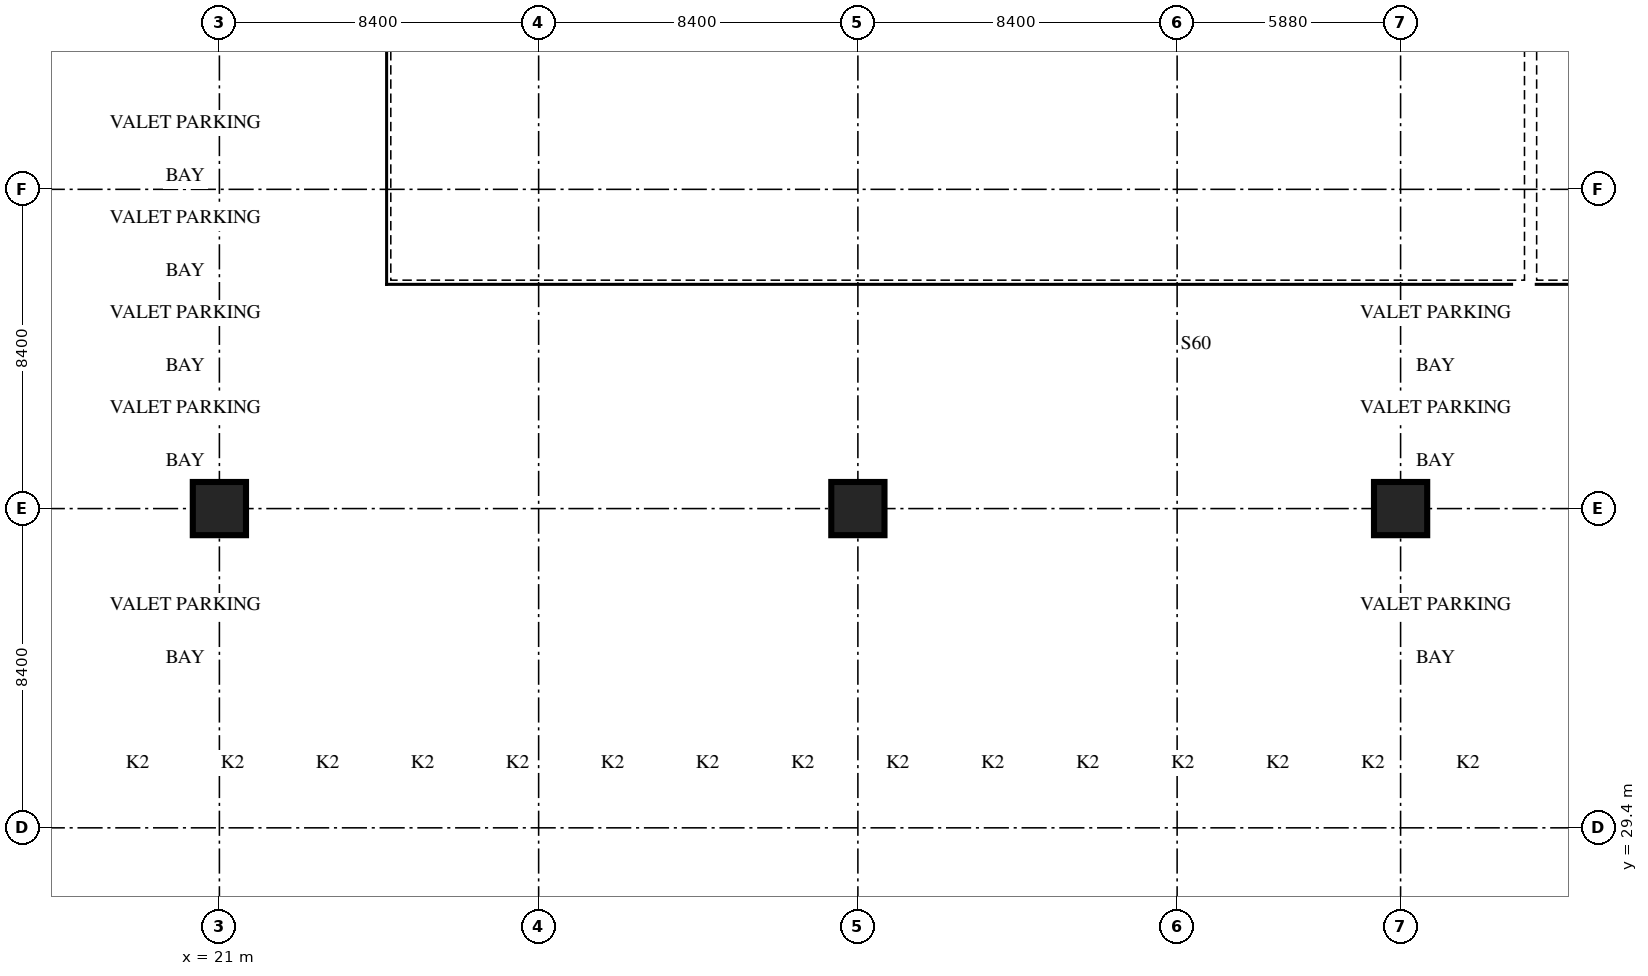
"""IFC4 building model, lengths in metres.
Left out: names, types, materials, properties, quantities, classifications, styles, units other than length and angle.
Written with IfcOpenShell. Run it as: python <this file> out.ifc"""

import sys

from ifc_helpers import new_model, si_unit, direction, frame, origin, origin_2d, place, context, subcontext, project, spatial, rectangle, extrude, source, transform, mapped, element, save


model = new_model("IFC4")
c1 = context("Model", 3, precision=1e-05, world=origin(), true_north=direction((0.0, 1.0)))
c2 = subcontext(c1, "Body", "Model", "MODEL_VIEW")
j1 = project(units=[si_unit("LENGTHUNIT", "METRE"), si_unit("PLANEANGLEUNIT", "RADIAN")], contexts=[c1])
p1 = place(None, origin())
s1 = spatial("IfcSite", under=j1, at=p1, CompositionType="ELEMENT")
p2 = place(p1, origin())
s2 = spatial("IfcBuilding", under=s1, at=p2, CompositionType="ELEMENT")
p3 = place(p2, frame((0.0, 0.0, -4.5)))
s3 = spatial("IfcBuildingStorey", under=s2, at=p3, CompositionType="ELEMENT", Elevation=-4.5)
m1 = source(origin(), c2, "Body", "SweptSolid", [
    extrude(rectangle(XDim=1.4, YDim=1.4, at=origin_2d()), origin(), (0.0, 0.0, 1.0), 4.5),
])
for number, where, z_axis, x_axis in (
    (1, (21.0, 37.8, 0.0), (0.0, 0.0, 1.0), (1.0, 0.0, 0.0)),
    (2, (37.8, 37.8, 0.0), (0.0, 0.0, 1.0), (1.0, 0.0, 0.0)),
    (3, (52.08, 37.8, 0.0), (0.0, 0.0, 1.0), (1.0, 0.0, 0.0)),
):
    element("IfcColumn", number, at=place(p3, frame(where, z_axis=z_axis, x_axis=x_axis)), inside=s3, PredefinedType="COLUMN", context=c2, shape_type="MappedRepresentation", body=[
        mapped(m1, transform((0.0, 0.0, 0.0), scale=1.0)),
    ])
save(model, sys.argv[1])
